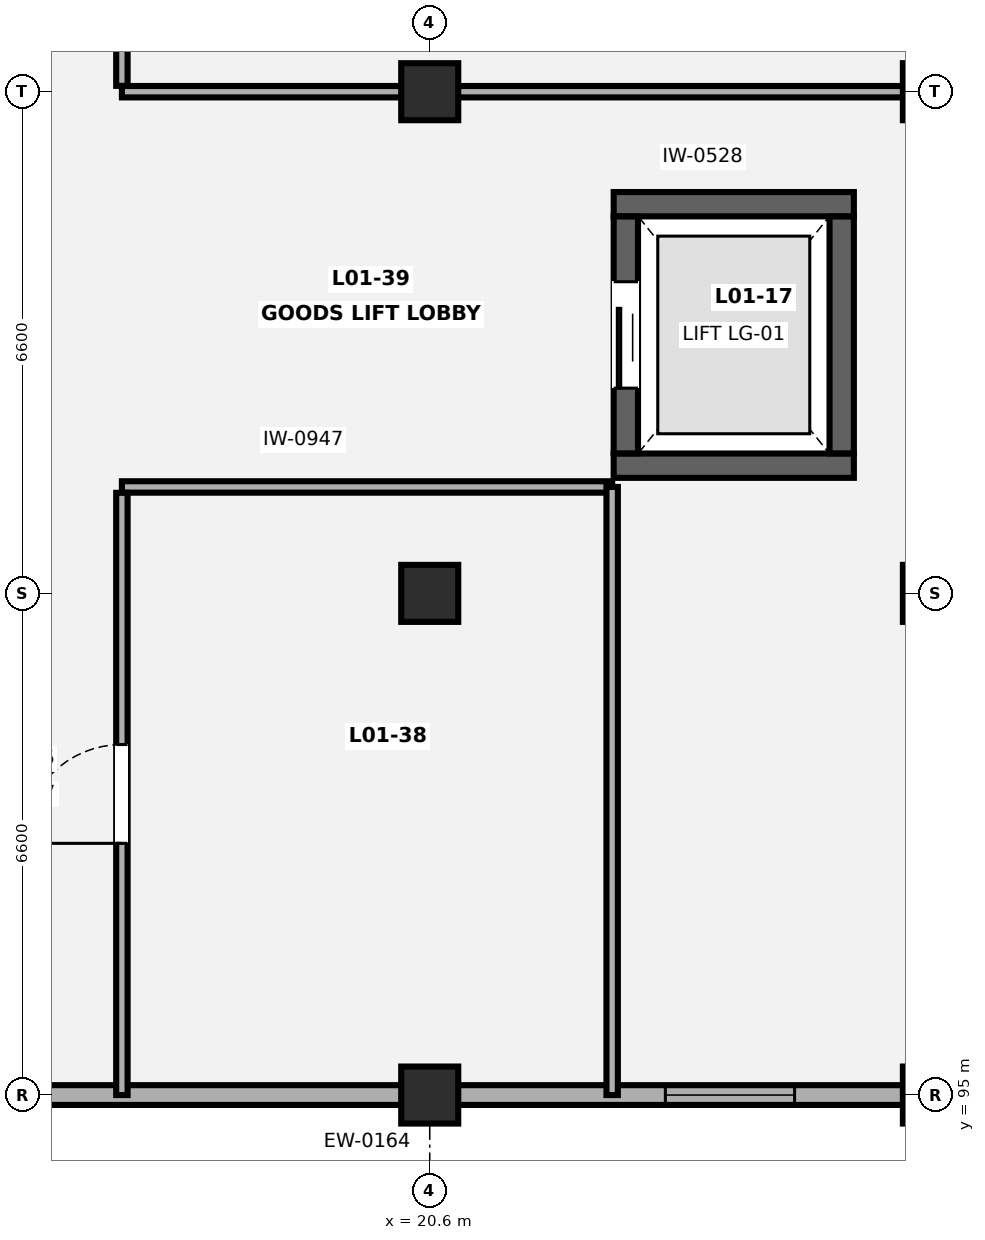
"""IFC4 building model, lengths in metres.
Left out: names, types, materials, properties, quantities, classifications, styles, units other than length and angle.
Written with IfcOpenShell. Run it as: python <this file> out.ifc"""

import sys

from ifc_helpers import new_model, si_unit, direction, frame, frame_2d, origin, origin_2d, place, context, subcontext, project, spatial, rectangle, extrude, element, fill, save


model = new_model("IFC4")
c1 = context("Model", 3, precision=1e-05, world=origin(), true_north=direction((0.0, 1.0)))
c2 = subcontext(c1, "Body", "Model", "MODEL_VIEW")
j1 = project(units=[si_unit("LENGTHUNIT", "METRE"), si_unit("PLANEANGLEUNIT", "RADIAN")], contexts=[c1])
p1 = place(None, origin())
s1 = spatial("IfcSite", under=j1, at=p1, CompositionType="ELEMENT")
p2 = place(p1, origin())
s2 = spatial("IfcBuilding", under=s1, at=p2, CompositionType="ELEMENT")
p3 = place(p2, frame((0.0, 0.0, 4.9)))
s3 = spatial("IfcBuildingStorey", under=s2, at=p3, CompositionType="ELEMENT", Elevation=4.9)
for number, where, z_axis, x_axis in (
    (1, (20.6, 95.0, 0.0), (0.0, 0.0, 1.0), (1.0, 0.0, 0.0)),
    (2, (20.6, 101.6, 0.0), (0.0, 0.0, 1.0), (1.0, 0.0, 0.0)),
    (3, (20.6, 108.2, 0.0), (0.0, 0.0, 1.0), (1.0, 0.0, 0.0)),
    (4, (27.2, 95.0, 0.0), (0.0, 0.0, 1.0), (1.0, 0.0, 0.0)),
    (5, (27.2, 101.6, 0.0), (0.0, 0.0, 1.0), (1.0, 0.0, 0.0)),
    (6, (27.2, 108.2, 0.0), (0.0, 0.0, 1.0), (1.0, 0.0, 0.0)),
):
    element("IfcColumn", number, at=place(p3, frame(where, z_axis=z_axis, x_axis=x_axis)), inside=s3, PredefinedType="COLUMN", context=c2, shape_type="SweptSolid", body=[
        extrude(rectangle(XDim=0.75, YDim=0.75, at=origin_2d()), origin(), (0.0, 0.0, 1.0), 4.2),
    ])
p4 = place(p3, frame((26.827, 95.0, 0.0), z_axis=(0.0, 0.0, 1.0), x_axis=(-1.0, 0.0, 0.0)))
e7 = element("IfcWall", 7, at=p4, inside=s3, PredefinedType="SOLIDWALL", context=c2, shape_type="SweptSolid", body=[
    extrude(rectangle(XDim=19.054, YDim=0.26, at=frame_2d((9.527, 0.0))), origin(), (0.0, 0.0, 1.0), 2.48),
])
p5 = place(p4, frame((1.427, 0.0, 0.85)))
e8 = element("IfcOpeningElement", 8, at=p5, cuts=e7, PredefinedType="OPENING", context=c2, shape_type="SweptSolid", body=[
    extrude(rectangle(XDim=1.7, YDim=1.4, at=frame_2d((0.85, 0.7))), frame((0.0, 0.14, 0.0), z_axis=(0.0, -1.0, 0.0), x_axis=(1.0, 0.0, 0.0)), (0.0, 0.0, 1.0), 0.28),
])
for number, where, z_axis, x_axis in (
    (9, (23.02, 103.28, 0.0), (0.0, 0.0, 1.0), (1.0, 0.0, 0.0)),
    (10, (23.02, 106.72, 0.0), (0.0, 0.0, 1.0), (1.0, 0.0, 0.0)),
):
    element("IfcWall", number, at=place(p3, frame(where, z_axis=z_axis, x_axis=x_axis)), inside=s3, PredefinedType="SHEAR", context=c2, shape_type="SweptSolid", body=[
        extrude(rectangle(XDim=3.16, YDim=0.32, at=frame_2d((1.58, 0.0))), origin(), (0.0, 0.0, 1.0), 3.85),
    ])
p6 = place(p3, frame((23.18, 103.442, 0.0), z_axis=(0.0, 0.0, 1.0), x_axis=(0.0, 1.0, 0.0)))
e11 = element("IfcWall", 11, at=p6, inside=s3, PredefinedType="SHEAR", context=c2, shape_type="SweptSolid", body=[
    extrude(rectangle(XDim=3.116, YDim=0.32, at=frame_2d((1.558, 0.0))), origin(), (0.0, 0.0, 1.0), 3.85),
])
p7 = place(p6, frame((0.858, 0.0, 0.0)))
e12 = element("IfcOpeningElement", 12, at=p7, cuts=e11, PredefinedType="OPENING", context=c2, shape_type="SweptSolid", body=[
    extrude(rectangle(XDim=1.4, YDim=2.25, at=frame_2d((0.7, 1.125))), frame((0.0, 0.17, 0.0), z_axis=(0.0, -1.0, 0.0), x_axis=(1.0, 0.0, 0.0)), (0.0, 0.0, 1.0), 0.34),
])
p8 = place(p3, frame((26.02, 103.442, 0.0), z_axis=(0.0, 0.0, 1.0), x_axis=(0.0, 1.0, 0.0)))
e13 = element("IfcWall", 13, at=p8, inside=s3, PredefinedType="SHEAR", context=c2, shape_type="SweptSolid", body=[
    extrude(rectangle(XDim=3.116, YDim=0.32, at=frame_2d((1.558, 0.0))), origin(), (0.0, 0.0, 1.0), 3.85),
])
p9 = place(p3, frame((16.55, 103.0, 0.0), z_axis=(0.0, 0.0, 1.0), x_axis=(1.0, 0.0, 0.0)))
e14 = element("IfcWall", 14, at=p9, inside=s3, PredefinedType="PARTITIONING", context=c2, shape_type="SweptSolid", body=[
    extrude(rectangle(XDim=6.45, YDim=0.15, at=frame_2d((3.225, 0.0))), origin(), (0.0, 0.0, 1.0), 3.85),
])
p10 = place(p3, frame((16.55, 95.0, 0.0), z_axis=(0.0, 0.0, 1.0), x_axis=(0.0, 1.0, 0.0)))
e15 = element("IfcWall", 15, at=p10, inside=s3, PredefinedType="PARTITIONING", context=c2, shape_type="SweptSolid", body=[
    extrude(rectangle(XDim=7.923, YDim=0.15, at=frame_2d((3.961, 0.0))), origin(), (0.0, 0.0, 1.0), 3.85),
])
p11 = place(p10, frame((3.312, 0.0, 0.0)))
e16 = element("IfcOpeningElement", 16, at=p11, cuts=e15, PredefinedType="OPENING", context=c2, shape_type="SweptSolid", body=[
    extrude(rectangle(XDim=1.3, YDim=2.2, at=frame_2d((0.65, 1.1))), frame((0.0, 0.085, 0.0), z_axis=(0.0, -1.0, 0.0), x_axis=(1.0, 0.0, 0.0)), (0.0, 0.0, 1.0), 0.17),
])
p12 = place(p3, frame((23.0, 95.0, 0.0), z_axis=(0.0, 0.0, 1.0), x_axis=(0.0, 1.0, 0.0)))
e17 = element("IfcWall", 17, at=p12, inside=s3, PredefinedType="PARTITIONING", context=c2, shape_type="SweptSolid", body=[
    extrude(rectangle(XDim=8.0, YDim=0.15, at=frame_2d((4.0, 0.0))), origin(), (0.0, 0.0, 1.0), 3.85),
])
p13 = place(p3, frame((16.55, 108.2, 0.0), z_axis=(0.0, 0.0, 1.0), x_axis=(1.0, 0.0, 0.0)))
e18 = element("IfcWall", 18, at=p13, inside=s3, PredefinedType="PARTITIONING", context=c2, shape_type="SweptSolid", body=[
    extrude(rectangle(XDim=10.508, YDim=0.15, at=frame_2d((5.254, 0.0))), origin(), (0.0, 0.0, 1.0), 2.435),
])
p14 = place(p3, frame((16.55, 108.277, 0.0), z_axis=(0.0, 0.0, 1.0), x_axis=(0.0, 1.0, 0.0)))
e19 = element("IfcWall", 19, at=p14, inside=s3, PredefinedType="PARTITIONING", context=c2, shape_type="SweptSolid", body=[
    extrude(rectangle(XDim=13.046, YDim=0.15, at=frame_2d((6.523, 0.0))), origin(), (0.0, 0.0, 1.0), 3.85),
])
p15 = place(p14, frame((5.873, 0.0, 0.0)))
e20 = element("IfcOpeningElement", 20, at=p15, cuts=e19, PredefinedType="OPENING", context=c2, shape_type="SweptSolid", body=[
    extrude(rectangle(XDim=1.3, YDim=2.2, at=frame_2d((0.65, 1.1))), frame((0.0, 0.085, 0.0), z_axis=(0.0, -1.0, 0.0), x_axis=(1.0, 0.0, 0.0)), (0.0, 0.0, 1.0), 0.17),
])
p16 = place(p5, origin())
e21 = element("IfcWindow", 21, at=p16, inside=s3, PartitioningType="SINGLE_PANEL", PredefinedType="WINDOW", context=c2, shape_type="SweptSolid", body=[
    extrude(rectangle(XDim=1.7, YDim=1.4, at=frame_2d((0.85, 0.7))), frame((0.0, 0.03, 0.0), z_axis=(0.0, -1.0, 0.0), x_axis=(1.0, 0.0, 0.0)), (0.0, 0.0, 1.0), 0.06),
])
fill(e8, e21)
p17 = place(p7, origin())
e22 = element("IfcDoor", 22, at=p17, inside=s3, OperationType="DOUBLE_DOOR_SLIDING", PredefinedType="DOOR", context=c2, shape_type="SweptSolid", body=[
    extrude(rectangle(XDim=1.4, YDim=2.25, at=frame_2d((0.7, 1.125))), frame((0.0, 0.025, 0.0), z_axis=(0.0, -1.0, 0.0), x_axis=(1.0, 0.0, 0.0)), (0.0, 0.0, 1.0), 0.05),
])
fill(e12, e22)
p18 = place(p11, origin())
e23 = element("IfcDoor", 23, at=p18, inside=s3, OperationType="SINGLE_SWING_LEFT", PredefinedType="DOOR", context=c2, shape_type="SweptSolid", body=[
    extrude(rectangle(XDim=1.3, YDim=2.2, at=frame_2d((0.65, 1.1))), frame((0.0, 0.025, 0.0), z_axis=(0.0, -1.0, 0.0), x_axis=(1.0, 0.0, 0.0)), (0.0, 0.0, 1.0), 0.05),
])
fill(e16, e23)
save(model, sys.argv[1])
